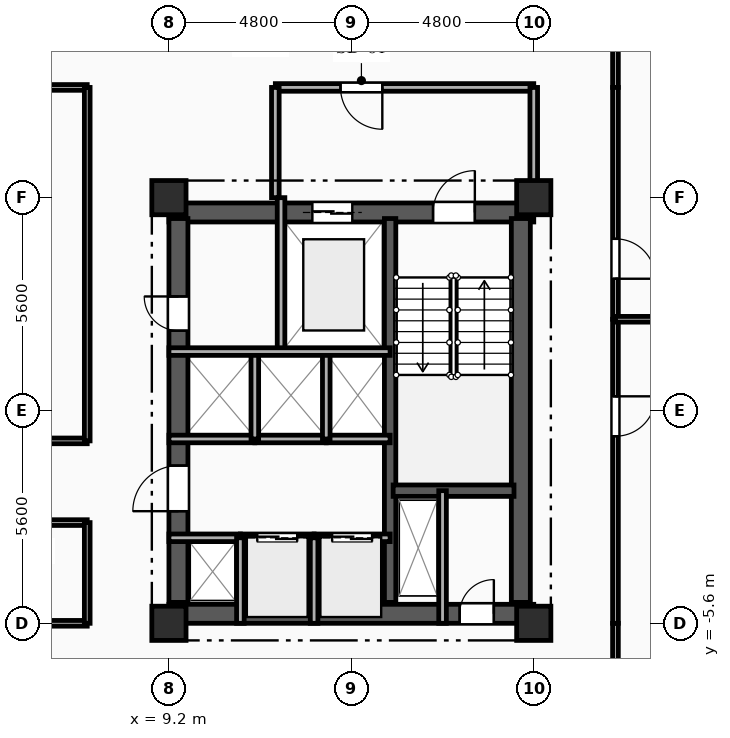
"""IFC4 building model, lengths in metres.
Left out: names, types, materials, properties, quantities, classifications, styles, units other than length and angle.
Written with IfcOpenShell. Run it as: python <this file> out.ifc"""

import sys

from ifc_helpers import new_model, si_unit, direction, frame, frame_2d, origin, origin_2d, place, context, subcontext, project, spatial, rectangle, extrude, element, fill, save


model = new_model("IFC4")
c1 = context("Model", 3, precision=1e-05, world=origin(), true_north=direction((0.0, 1.0)))
c2 = subcontext(c1, "Body", "Model", "MODEL_VIEW")
j1 = project(units=[si_unit("LENGTHUNIT", "METRE"), si_unit("PLANEANGLEUNIT", "RADIAN")], contexts=[c1])
p1 = place(None, origin())
s1 = spatial("IfcSite", under=j1, at=p1, CompositionType="ELEMENT")
p2 = place(p1, origin())
s2 = spatial("IfcBuilding", under=s1, at=p2, CompositionType="ELEMENT")
p3 = place(p2, frame((0.0, 0.0, 164.5)))
s3 = spatial("IfcBuildingStorey", under=s2, at=p3, CompositionType="ELEMENT", Elevation=164.5)
for number, where, z_axis, x_axis in (
    (1, (9.2, -5.6, 0.0), (0.0, 0.0, 1.0), (1.0, 0.0, 0.0)),
    (2, (9.2, 5.6, 0.0), (0.0, 0.0, 1.0), (1.0, 0.0, 0.0)),
    (3, (18.8, -5.6, 0.0), (0.0, 0.0, 1.0), (1.0, 0.0, 0.0)),
    (4, (18.8, 5.6, 0.0), (0.0, 0.0, 1.0), (1.0, 0.0, 0.0)),
):
    element("IfcColumn", number, at=place(p3, frame(where, z_axis=z_axis, x_axis=x_axis)), inside=s3, PredefinedType="COLUMN", context=c2, shape_type="SweptSolid", body=[
        extrude(rectangle(XDim=0.9, YDim=0.9, at=origin_2d()), origin(), (0.0, 0.0, 1.0), 3.35),
    ])
p4 = place(p3, frame((9.2, 5.21, 0.0), z_axis=(0.0, 0.0, 1.0), x_axis=(1.0, 0.0, 0.0)))
e5 = element("IfcWall", 5, at=p4, inside=s3, PredefinedType="SHEAR", context=c2, shape_type="SweptSolid", body=[
    extrude(rectangle(XDim=9.6, YDim=0.5, at=frame_2d((4.8, 0.0))), origin(), (0.0, 0.0, 1.0), 3.04),
])
p5 = place(p4, frame((6.95, 0.0, 0.0)))
e6 = element("IfcOpeningElement", 6, at=p5, cuts=e5, PredefinedType="OPENING", context=c2, shape_type="SweptSolid", body=[
    extrude(rectangle(XDim=1.1, YDim=2.15, at=frame_2d((0.55, 1.075))), frame((0.0, 0.26, 0.0), z_axis=(0.0, -1.0, 0.0), x_axis=(1.0, 0.0, 0.0)), (0.0, 0.0, 1.0), 0.52),
])
p6 = place(p4, frame((3.775, 0.0, 0.0)))
e7 = element("IfcOpeningElement", 7, at=p6, cuts=e5, PredefinedType="OPENING", context=c2, shape_type="SweptSolid", body=[
    extrude(rectangle(XDim=1.05, YDim=2.1, at=frame_2d((0.525, 1.05))), frame((0.0, 0.26, 0.0), z_axis=(0.0, -1.0, 0.0), x_axis=(1.0, 0.0, 0.0)), (0.0, 0.0, 1.0), 0.52),
])
p7 = place(p3, frame((9.2, -5.35, 0.0), z_axis=(0.0, 0.0, 1.0), x_axis=(1.0, 0.0, 0.0)))
e8 = element("IfcWall", 8, at=p7, inside=s3, PredefinedType="SHEAR", context=c2, shape_type="SweptSolid", body=[
    extrude(rectangle(XDim=9.6, YDim=0.5, at=frame_2d((4.8, 0.0))), origin(), (0.0, 0.0, 1.0), 3.04),
])
p8 = place(p7, frame((7.65, 0.0, 0.0)))
e9 = element("IfcOpeningElement", 9, at=p8, cuts=e8, PredefinedType="OPENING", context=c2, shape_type="SweptSolid", body=[
    extrude(rectangle(XDim=0.9, YDim=2.1, at=frame_2d((0.45, 1.05))), frame((0.0, 0.26, 0.0), z_axis=(0.0, -1.0, 0.0), x_axis=(1.0, 0.0, 0.0)), (0.0, 0.0, 1.0), 0.52),
])
p9 = place(p3, frame((9.45, -5.05, 0.0), z_axis=(0.0, 0.0, 1.0), x_axis=(0.0, 1.0, 0.0)))
e10 = element("IfcWall", 10, at=p9, inside=s3, PredefinedType="SHEAR", context=c2, shape_type="SweptSolid", body=[
    extrude(rectangle(XDim=10.1, YDim=0.5, at=frame_2d((5.05, 0.0))), origin(), (0.0, 0.0, 1.0), 3.04),
])
p10 = place(p9, frame((7.15, 0.0, 0.0)))
e11 = element("IfcOpeningElement", 11, at=p10, cuts=e10, PredefinedType="OPENING", context=c2, shape_type="SweptSolid", body=[
    extrude(rectangle(XDim=0.9, YDim=2.1, at=frame_2d((0.45, 1.05))), frame((0.0, 0.26, 0.0), z_axis=(0.0, -1.0, 0.0), x_axis=(1.0, 0.0, 0.0)), (0.0, 0.0, 1.0), 0.52),
])
p11 = place(p9, frame((2.4, 0.0, 0.0)))
e12 = element("IfcOpeningElement", 12, at=p11, cuts=e10, PredefinedType="OPENING", context=c2, shape_type="SweptSolid", body=[
    extrude(rectangle(XDim=1.2, YDim=2.15, at=frame_2d((0.6, 1.075))), frame((0.0, 0.26, 0.0), z_axis=(0.0, -1.0, 0.0), x_axis=(1.0, 0.0, 0.0)), (0.0, 0.0, 1.0), 0.52),
])
p12 = place(p3, frame((18.46, -5.05, 0.0), z_axis=(0.0, 0.0, 1.0), x_axis=(0.0, 1.0, 0.0)))
e13 = element("IfcWall", 13, at=p12, inside=s3, PredefinedType="SHEAR", context=c2, shape_type="SweptSolid", body=[
    extrude(rectangle(XDim=10.1, YDim=0.5, at=frame_2d((5.05, 0.0))), origin(), (0.0, 0.0, 1.0), 3.04),
])
p13 = place(p3, frame((15.02, -5.05, 0.0), z_axis=(0.0, 0.0, 1.0), x_axis=(0.0, 1.0, 0.0)))
e14 = element("IfcWall", 14, at=p13, inside=s3, PredefinedType="SHEAR", context=c2, shape_type="SweptSolid", body=[
    extrude(rectangle(XDim=10.1, YDim=0.3, at=frame_2d((5.05, 0.0))), origin(), (0.0, 0.0, 1.0), 3.04),
])
p14 = place(p3, frame((15.1, -2.11, 0.0), z_axis=(0.0, 0.0, 1.0), x_axis=(1.0, 0.0, 0.0)))
e15 = element("IfcWall", 15, at=p14, inside=s3, PredefinedType="SHEAR", context=c2, shape_type="SweptSolid", body=[
    extrude(rectangle(XDim=3.18, YDim=0.3, at=frame_2d((1.59, 0.0))), origin(), (0.0, 0.0, 1.0), 3.04),
])
p15 = place(p3, frame((16.4, -2.11, 0.0), z_axis=(0.0, 0.0, 1.0), x_axis=(0.0, -1.0, 0.0)))
e16 = element("IfcWall", 16, at=p15, inside=s3, PredefinedType="PARTITIONING", context=c2, shape_type="SweptSolid", body=[
    extrude(rectangle(XDim=3.49, YDim=0.2, at=frame_2d((1.745, 0.0))), origin(), (0.0, 0.0, 1.0), 3.04),
])
p16 = place(p3, frame((12.15, 5.6, 0.0), z_axis=(0.0, 0.0, 1.0), x_axis=(0.0, -1.0, 0.0)))
e17 = element("IfcWall", 17, at=p16, inside=s3, PredefinedType="PARTITIONING", context=c2, shape_type="SweptSolid", body=[
    extrude(rectangle(XDim=4.05, YDim=0.2, at=frame_2d((2.025, 0.0))), origin(), (0.0, 0.0, 1.0), 3.04),
])
p17 = place(p3, frame((18.8, 8.5, 0.0), z_axis=(0.0, 0.0, 1.0), x_axis=(-1.0, 0.0, 0.0)))
e18 = element("IfcWall", 18, at=p17, inside=s3, PredefinedType="PARTITIONING", context=c2, shape_type="SweptSolid", body=[
    extrude(rectangle(XDim=6.8, YDim=0.2, at=frame_2d((3.4, 0.0))), origin(), (0.0, 0.0, 1.0), 3.04),
])
p18 = place(p17, frame((3.985, 0.0, 0.0)))
e19 = element("IfcOpeningElement", 19, at=p18, cuts=e18, PredefinedType="OPENING", context=c2, shape_type="SweptSolid", body=[
    extrude(rectangle(XDim=1.1, YDim=2.15, at=frame_2d((0.55, 1.075))), frame((0.0, 0.11, 0.0), z_axis=(0.0, -1.0, 0.0), x_axis=(1.0, 0.0, 0.0)), (0.0, 0.0, 1.0), 0.22),
])
p19 = place(p3, frame((18.8, 5.6, 0.0), z_axis=(0.0, 0.0, 1.0), x_axis=(0.0, 1.0, 0.0)))
e20 = element("IfcWall", 20, at=p19, inside=s3, PredefinedType="PARTITIONING", context=c2, shape_type="SweptSolid", body=[
    extrude(rectangle(XDim=2.9, YDim=0.2, at=frame_2d((1.45, 0.0))), origin(), (0.0, 0.0, 1.0), 2.525),
])
p20 = place(p3, frame((12.0, 8.5, 0.0), z_axis=(0.0, 0.0, 1.0), x_axis=(0.0, -1.0, 0.0)))
e21 = element("IfcWall", 21, at=p20, inside=s3, PredefinedType="PARTITIONING", context=c2, shape_type="SweptSolid", body=[
    extrude(rectangle(XDim=2.9, YDim=0.2, at=frame_2d((1.45, 0.0))), origin(), (0.0, 0.0, 1.0), 3.04),
])
p21 = place(p3, frame((9.2, -3.35, 0.0), z_axis=(0.0, 0.0, 1.0), x_axis=(1.0, 0.0, 0.0)))
e22 = element("IfcWall", 22, at=p21, inside=s3, PredefinedType="PARTITIONING", context=c2, shape_type="SweptSolid", body=[
    extrude(rectangle(XDim=1.88, YDim=0.2, at=frame_2d((0.94, 0.0))), origin(), (0.0, 0.0, 1.0), 2.755),
])
p22 = place(p3, frame((11.08, -3.35, 0.0), z_axis=(0.0, 0.0, 1.0), x_axis=(1.0, 0.0, 0.0)))
e23 = element("IfcWall", 23, at=p22, inside=s3, PredefinedType="PARTITIONING", context=c2, shape_type="SweptSolid", body=[
    extrude(rectangle(XDim=1.94, YDim=0.2, at=frame_2d((0.97, 0.0))), origin(), (0.0, 0.0, 1.0), 3.04),
])
p23 = place(p22, frame((0.445, 0.0, 0.0)))
e24 = element("IfcOpeningElement", 24, at=p23, cuts=e23, PredefinedType="OPENING", context=c2, shape_type="SweptSolid", body=[
    extrude(rectangle(XDim=1.05, YDim=2.1, at=frame_2d((0.525, 1.05))), frame((0.0, 0.11, 0.0), z_axis=(0.0, -1.0, 0.0), x_axis=(1.0, 0.0, 0.0)), (0.0, 0.0, 1.0), 0.22),
])
p24 = place(p3, frame((13.02, -3.35, 0.0), z_axis=(0.0, 0.0, 1.0), x_axis=(1.0, 0.0, 0.0)))
e25 = element("IfcWall", 25, at=p24, inside=s3, PredefinedType="PARTITIONING", context=c2, shape_type="SweptSolid", body=[
    extrude(rectangle(XDim=2.0, YDim=0.2, at=frame_2d((1.0, 0.0))), origin(), (0.0, 0.0, 1.0), 3.04),
])
p25 = place(p24, frame((0.475, 0.0, 0.0)))
e26 = element("IfcOpeningElement", 26, at=p25, cuts=e25, PredefinedType="OPENING", context=c2, shape_type="SweptSolid", body=[
    extrude(rectangle(XDim=1.05, YDim=2.1, at=frame_2d((0.525, 1.05))), frame((0.0, 0.11, 0.0), z_axis=(0.0, -1.0, 0.0), x_axis=(1.0, 0.0, 0.0)), (0.0, 0.0, 1.0), 0.22),
])
p26 = place(p3, frame((11.46, -0.75, 0.0), z_axis=(0.0, 0.0, 1.0), x_axis=(-1.0, 0.0, 0.0)))
e27 = element("IfcWall", 27, at=p26, inside=s3, PredefinedType="PARTITIONING", context=c2, shape_type="SweptSolid", body=[
    extrude(rectangle(XDim=2.26, YDim=0.2, at=frame_2d((1.13, 0.0))), origin(), (0.0, 0.0, 1.0), 3.04),
])
p27 = place(p3, frame((13.34, -0.75, 0.0), z_axis=(0.0, 0.0, 1.0), x_axis=(-1.0, 0.0, 0.0)))
e28 = element("IfcWall", 28, at=p27, inside=s3, PredefinedType="PARTITIONING", context=c2, shape_type="SweptSolid", body=[
    extrude(rectangle(XDim=1.88, YDim=0.2, at=frame_2d((0.94, 0.0))), origin(), (0.0, 0.0, 1.0), 3.04),
])
p28 = place(p3, frame((15.02, -0.75, 0.0), z_axis=(0.0, 0.0, 1.0), x_axis=(-1.0, 0.0, 0.0)))
e29 = element("IfcWall", 29, at=p28, inside=s3, PredefinedType="PARTITIONING", context=c2, shape_type="SweptSolid", body=[
    extrude(rectangle(XDim=1.68, YDim=0.2, at=frame_2d((0.84, 0.0))), origin(), (0.0, 0.0, 1.0), 3.04),
])
for number, where, z_axis, x_axis in (
    (30, (11.08, -5.6, 0.0), (0.0, 0.0, 1.0), (0.0, 1.0, 0.0)),
    (31, (13.02, -5.6, 0.0), (0.0, 0.0, 1.0), (0.0, 1.0, 0.0)),
):
    element("IfcWall", number, at=place(p3, frame(where, z_axis=z_axis, x_axis=x_axis)), inside=s3, PredefinedType="PARTITIONING", context=c2, shape_type="SweptSolid", body=[
        extrude(rectangle(XDim=2.25, YDim=0.2, at=frame_2d((1.125, 0.0))), origin(), (0.0, 0.0, 1.0), 3.04),
    ])
for number, where, z_axis, x_axis in (
    (32, (11.46, -0.75, 0.0), (0.0, 0.0, 1.0), (0.0, 1.0, 0.0)),
    (33, (13.34, -0.75, 0.0), (0.0, 0.0, 1.0), (0.0, 1.0, 0.0)),
):
    element("IfcWall", number, at=place(p3, frame(where, z_axis=z_axis, x_axis=x_axis)), inside=s3, PredefinedType="PARTITIONING", context=c2, shape_type="SweptSolid", body=[
        extrude(rectangle(XDim=2.3, YDim=0.2, at=frame_2d((1.15, 0.0))), origin(), (0.0, 0.0, 1.0), 3.04),
    ])
p29 = place(p3, frame((20.95, 10.65, 0.0), z_axis=(0.0, 0.0, 1.0), x_axis=(0.0, -1.0, 0.0)))
e34 = element("IfcWall", 34, at=p29, inside=s3, PredefinedType="PARTITIONING", context=c2, shape_type="SweptSolid", body=[
    extrude(rectangle(XDim=2.15, YDim=0.15, at=frame_2d((1.075, 0.0))), origin(), (0.0, 0.0, 1.0), 3.04),
])
p30 = place(p3, frame((7.05, 8.5, 0.0), z_axis=(0.0, 0.0, 1.0), x_axis=(-1.0, 0.0, 0.0)))
e35 = element("IfcWall", 35, at=p30, inside=s3, PredefinedType="PARTITIONING", context=c2, shape_type="SweptSolid", body=[
    extrude(rectangle(XDim=7.05, YDim=0.15, at=frame_2d((3.525, 0.0))), origin(), (0.0, 0.0, 1.0), 3.04),
])
p31 = place(p3, frame((20.95, -5.6, 0.0), z_axis=(0.0, 0.0, 1.0), x_axis=(0.0, -1.0, 0.0)))
e36 = element("IfcWall", 36, at=p31, inside=s3, PredefinedType="PARTITIONING", context=c2, shape_type="SweptSolid", body=[
    extrude(rectangle(XDim=2.15, YDim=0.15, at=frame_2d((1.075, 0.0))), origin(), (0.0, 0.0, 1.0), 3.04),
])
p32 = place(p3, frame((0.0, -5.6, 0.0), z_axis=(0.0, 0.0, 1.0), x_axis=(1.0, 0.0, 0.0)))
e37 = element("IfcWall", 37, at=p32, inside=s3, PredefinedType="PARTITIONING", context=c2, shape_type="SweptSolid", body=[
    extrude(rectangle(XDim=7.05, YDim=0.15, at=frame_2d((3.525, 0.0))), origin(), (0.0, 0.0, 1.0), 2.525),
])
p33 = place(p32, frame((1.185, 0.0, 0.0)))
e38 = element("IfcOpeningElement", 38, at=p33, cuts=e37, PredefinedType="OPENING", context=c2, shape_type="SweptSolid", body=[
    extrude(rectangle(XDim=1.05, YDim=2.15, at=frame_2d((0.525, 1.075))), frame((0.0, 0.085, 0.0), z_axis=(0.0, -1.0, 0.0), x_axis=(1.0, 0.0, 0.0)), (0.0, 0.0, 1.0), 0.17),
])
p34 = place(p3, frame((20.95, 2.4, 0.0), z_axis=(0.0, 0.0, 1.0), x_axis=(0.0, -1.0, 0.0)))
e39 = element("IfcWall", 39, at=p34, inside=s3, PredefinedType="PARTITIONING", context=c2, shape_type="SweptSolid", body=[
    extrude(rectangle(XDim=8.0, YDim=0.15, at=frame_2d((4.0, 0.0))), origin(), (0.0, 0.0, 1.0), 3.04),
])
p35 = place(p34, frame((2.028, 0.0, 0.0)))
e40 = element("IfcOpeningElement", 40, at=p35, cuts=e39, PredefinedType="OPENING", context=c2, shape_type="SweptSolid", body=[
    extrude(rectangle(XDim=1.05, YDim=2.15, at=frame_2d((0.525, 1.075))), frame((0.0, 0.085, 0.0), z_axis=(0.0, -1.0, 0.0), x_axis=(1.0, 0.0, 0.0)), (0.0, 0.0, 1.0), 0.17),
])
p36 = place(p3, frame((20.95, 8.5, 0.0), z_axis=(0.0, 0.0, 1.0), x_axis=(0.0, -1.0, 0.0)))
e41 = element("IfcWall", 41, at=p36, inside=s3, PredefinedType="PARTITIONING", context=c2, shape_type="SweptSolid", body=[
    extrude(rectangle(XDim=6.1, YDim=0.15, at=frame_2d((3.05, 0.0))), origin(), (0.0, 0.0, 1.0), 3.04),
])
p37 = place(p36, frame((3.984, 0.0, 0.0)))
e42 = element("IfcOpeningElement", 42, at=p37, cuts=e41, PredefinedType="OPENING", context=c2, shape_type="SweptSolid", body=[
    extrude(rectangle(XDim=1.05, YDim=2.15, at=frame_2d((0.525, 1.075))), frame((0.0, 0.085, 0.0), z_axis=(0.0, -1.0, 0.0), x_axis=(1.0, 0.0, 0.0)), (0.0, 0.0, 1.0), 0.17),
])
p38 = place(p3, frame((-7.05, -0.8, 0.0), z_axis=(0.0, 0.0, 1.0), x_axis=(1.0, 0.0, 0.0)))
e43 = element("IfcWall", 43, at=p38, inside=s3, PredefinedType="PARTITIONING", context=c2, shape_type="SweptSolid", body=[
    extrude(rectangle(XDim=14.1, YDim=0.15, at=frame_2d((7.05, 0.0))), origin(), (0.0, 0.0, 1.0), 3.04),
])
p39 = place(p38, frame((6.525, 0.0, 0.0)))
e44 = element("IfcOpeningElement", 44, at=p39, cuts=e43, PredefinedType="OPENING", context=c2, shape_type="SweptSolid", body=[
    extrude(rectangle(XDim=1.05, YDim=2.15, at=frame_2d((0.525, 1.075))), frame((0.0, 0.085, 0.0), z_axis=(0.0, -1.0, 0.0), x_axis=(1.0, 0.0, 0.0)), (0.0, 0.0, 1.0), 0.17),
])
p40 = place(p3, frame((7.05, -2.95, 0.0), z_axis=(0.0, 0.0, 1.0), x_axis=(-1.0, 0.0, 0.0)))
e45 = element("IfcWall", 45, at=p40, inside=s3, PredefinedType="PARTITIONING", context=c2, shape_type="SweptSolid", body=[
    extrude(rectangle(XDim=7.05, YDim=0.15, at=frame_2d((3.525, 0.0))), origin(), (0.0, 0.0, 1.0), 3.04),
])
p41 = place(p3, frame((7.05, -0.8, 0.0), z_axis=(0.0, 0.0, 1.0), x_axis=(0.0, 1.0, 0.0)))
e46 = element("IfcWall", 46, at=p41, inside=s3, PredefinedType="PARTITIONING", context=c2, shape_type="SweptSolid", body=[
    extrude(rectangle(XDim=9.3, YDim=0.15, at=frame_2d((4.65, 0.0))), origin(), (0.0, 0.0, 1.0), 3.04),
])
p42 = place(p3, frame((7.05, -5.6, 0.0), z_axis=(0.0, 0.0, 1.0), x_axis=(0.0, 1.0, 0.0)))
e47 = element("IfcWall", 47, at=p42, inside=s3, PredefinedType="PARTITIONING", context=c2, shape_type="SweptSolid", body=[
    extrude(rectangle(XDim=2.65, YDim=0.15, at=frame_2d((1.325, 0.0))), origin(), (0.0, 0.0, 1.0), 3.04),
])
p43 = place(p3, frame((20.95, 2.4, 0.0), z_axis=(0.0, 0.0, 1.0), x_axis=(1.0, 0.0, 0.0)))
e48 = element("IfcWall", 48, at=p43, inside=s3, PredefinedType="PARTITIONING", context=c2, shape_type="SweptSolid", body=[
    extrude(rectangle(XDim=6.05, YDim=0.15, at=frame_2d((3.025, 0.0))), origin(), (0.0, 0.0, 1.0), 3.04),
])
p44 = place(p3, frame((9.2, 1.55, 0.0), z_axis=(0.0, 0.0, 1.0), x_axis=(1.0, 0.0, 0.0)))
e49 = element("IfcWall", 49, at=p44, inside=s3, PredefinedType="PARTITIONING", context=c2, shape_type="SweptSolid", body=[
    extrude(rectangle(XDim=5.82, YDim=0.2, at=frame_2d((2.91, 0.0))), origin(), (0.0, 0.0, 1.0), 3.04),
])
p45 = place(p5, origin())
e50 = element("IfcDoor", 50, at=p45, inside=s3, OperationType="SINGLE_SWING_RIGHT", PredefinedType="DOOR", context=c2, shape_type="SweptSolid", body=[
    extrude(rectangle(XDim=1.1, YDim=2.15, at=frame_2d((0.55, 1.075))), frame((0.0, 0.025, 0.0), z_axis=(0.0, -1.0, 0.0), x_axis=(1.0, 0.0, 0.0)), (0.0, 0.0, 1.0), 0.05),
])
fill(e6, e50)
p46 = place(p6, origin())
e51 = element("IfcDoor", 51, at=p46, inside=s3, OperationType="DOUBLE_DOOR_SLIDING", PredefinedType="DOOR", context=c2, shape_type="SweptSolid", body=[
    extrude(rectangle(XDim=1.05, YDim=2.1, at=frame_2d((0.525, 1.05))), frame((0.0, 0.025, 0.0), z_axis=(0.0, -1.0, 0.0), x_axis=(1.0, 0.0, 0.0)), (0.0, 0.0, 1.0), 0.05),
])
fill(e7, e51)
p47 = place(p8, origin())
e52 = element("IfcDoor", 52, at=p47, inside=s3, OperationType="SINGLE_SWING_RIGHT", PredefinedType="DOOR", context=c2, shape_type="SweptSolid", body=[
    extrude(rectangle(XDim=0.9, YDim=2.1, at=frame_2d((0.45, 1.05))), frame((0.0, 0.025, 0.0), z_axis=(0.0, -1.0, 0.0), x_axis=(1.0, 0.0, 0.0)), (0.0, 0.0, 1.0), 0.05),
])
fill(e9, e52)
p48 = place(p18, origin())
e53 = element("IfcDoor", 53, at=p48, inside=s3, OperationType="SINGLE_SWING_LEFT", PredefinedType="DOOR", context=c2, shape_type="SweptSolid", body=[
    extrude(rectangle(XDim=1.1, YDim=2.15, at=frame_2d((0.55, 1.075))), frame((0.0, 0.025, 0.0), z_axis=(0.0, -1.0, 0.0), x_axis=(1.0, 0.0, 0.0)), (0.0, 0.0, 1.0), 0.05),
])
fill(e19, e53)
p49 = place(p10, origin())
e54 = element("IfcDoor", 54, at=p49, inside=s3, OperationType="SINGLE_SWING_RIGHT", PredefinedType="DOOR", context=c2, shape_type="SweptSolid", body=[
    extrude(rectangle(XDim=0.9, YDim=2.1, at=frame_2d((0.45, 1.05))), frame((0.0, 0.025, 0.0), z_axis=(0.0, -1.0, 0.0), x_axis=(1.0, 0.0, 0.0)), (0.0, 0.0, 1.0), 0.05),
])
fill(e11, e54)
p50 = place(p23, origin())
e55 = element("IfcDoor", 55, at=p50, inside=s3, OperationType="DOUBLE_DOOR_SLIDING", PredefinedType="DOOR", context=c2, shape_type="SweptSolid", body=[
    extrude(rectangle(XDim=1.05, YDim=2.1, at=frame_2d((0.525, 1.05))), frame((0.0, 0.025, 0.0), z_axis=(0.0, -1.0, 0.0), x_axis=(1.0, 0.0, 0.0)), (0.0, 0.0, 1.0), 0.05),
])
fill(e24, e55)
p51 = place(p25, origin())
e56 = element("IfcDoor", 56, at=p51, inside=s3, OperationType="DOUBLE_DOOR_SLIDING", PredefinedType="DOOR", context=c2, shape_type="SweptSolid", body=[
    extrude(rectangle(XDim=1.05, YDim=2.1, at=frame_2d((0.525, 1.05))), frame((0.0, 0.025, 0.0), z_axis=(0.0, -1.0, 0.0), x_axis=(1.0, 0.0, 0.0)), (0.0, 0.0, 1.0), 0.05),
])
fill(e26, e56)
p52 = place(p11, origin())
e57 = element("IfcDoor", 57, at=p52, inside=s3, OperationType="SINGLE_SWING_LEFT", PredefinedType="DOOR", context=c2, shape_type="SweptSolid", body=[
    extrude(rectangle(XDim=1.2, YDim=2.15, at=frame_2d((0.6, 1.075))), frame((0.0, 0.025, 0.0), z_axis=(0.0, -1.0, 0.0), x_axis=(1.0, 0.0, 0.0)), (0.0, 0.0, 1.0), 0.05),
])
fill(e12, e57)
p53 = place(p35, origin())
e58 = element("IfcDoor", 58, at=p53, inside=s3, OperationType="SINGLE_SWING_LEFT", PredefinedType="DOOR", context=c2, shape_type="SweptSolid", body=[
    extrude(rectangle(XDim=1.05, YDim=2.15, at=frame_2d((0.525, 1.075))), frame((0.0, 0.025, 0.0), z_axis=(0.0, -1.0, 0.0), x_axis=(1.0, 0.0, 0.0)), (0.0, 0.0, 1.0), 0.05),
])
fill(e40, e58)
p54 = place(p37, origin())
e59 = element("IfcDoor", 59, at=p54, inside=s3, OperationType="SINGLE_SWING_RIGHT", PredefinedType="DOOR", context=c2, shape_type="SweptSolid", body=[
    extrude(rectangle(XDim=1.05, YDim=2.15, at=frame_2d((0.525, 1.075))), frame((0.0, 0.025, 0.0), z_axis=(0.0, -1.0, 0.0), x_axis=(1.0, 0.0, 0.0)), (0.0, 0.0, 1.0), 0.05),
])
fill(e42, e59)
save(model, sys.argv[1])
